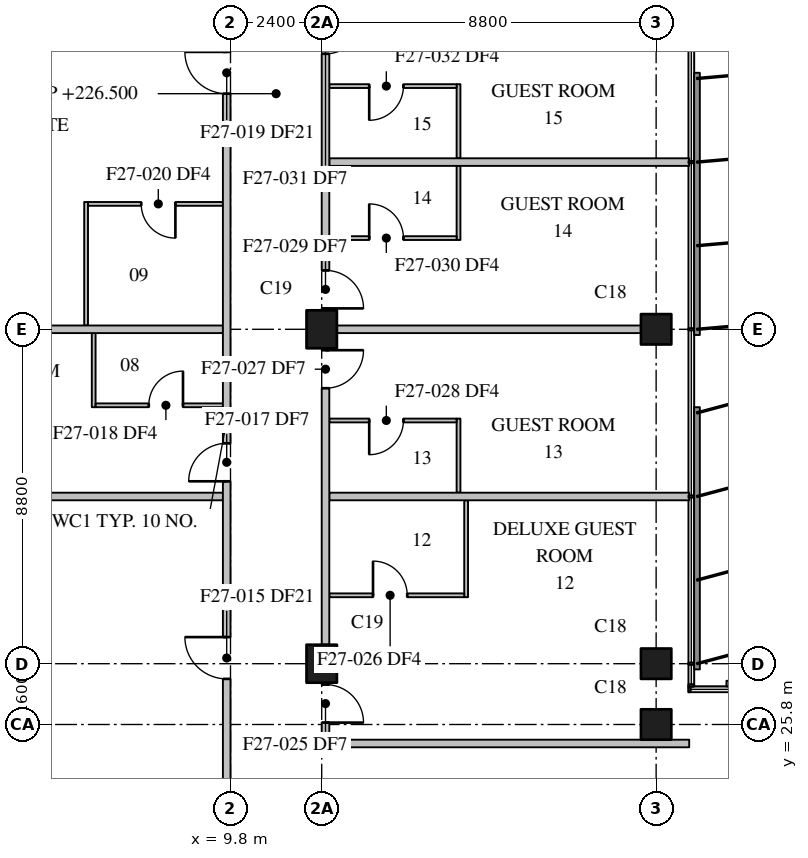
"""IFC4 building model, lengths in metres.
Left out: names, types, materials, properties, quantities, classifications, styles, units other than length and angle.
Written with IfcOpenShell. Run it as: python <this file> out.ifc"""

import sys

from ifc_helpers import new_model, si_unit, direction, frame, frame_2d, origin, origin_2d, place, context, subcontext, project, spatial, rectangle, extrude, element, fill, save


model = new_model("IFC4")
c1 = context("Model", 3, precision=1e-05, world=origin(), true_north=direction((0.0, 1.0)))
c2 = subcontext(c1, "Body", "Model", "MODEL_VIEW")
j1 = project(units=[si_unit("LENGTHUNIT", "METRE"), si_unit("PLANEANGLEUNIT", "RADIAN")], contexts=[c1])
p1 = place(None, origin())
s1 = spatial("IfcSite", under=j1, at=p1, CompositionType="ELEMENT")
p2 = place(p1, origin())
s2 = spatial("IfcBuilding", under=s1, at=p2, CompositionType="ELEMENT")
p3 = place(p2, frame((0.0, 0.0, 226.5)))
s3 = spatial("IfcBuildingStorey", under=s2, at=p3, CompositionType="ELEMENT", Elevation=226.5)
for number, where, z_axis, x_axis in (
    (1, (12.2, 27.4, 0.0), (0.0, 0.0, 1.0), (0.0, 1.0, 0.0)),
    (2, (12.2, 36.2, 0.0), (0.0, 0.0, 1.0), (0.0, 1.0, 0.0)),
):
    element("IfcColumn", number, at=place(p3, frame(where, z_axis=z_axis, x_axis=x_axis)), inside=s3, PredefinedType="COLUMN", context=c2, shape_type="SweptSolid", body=[
        extrude(rectangle(XDim=1.0, YDim=0.8, at=origin_2d()), origin(), (0.0, 0.0, 1.0), 3.7),
    ])
for number, where, z_axis, x_axis in (
    (3, (21.0, 25.8, 0.0), (0.0, 0.0, 1.0), (1.0, 0.0, 0.0)),
    (4, (21.0, 27.4, 0.0), (0.0, 0.0, 1.0), (1.0, 0.0, 0.0)),
    (5, (21.0, 36.2, 0.0), (0.0, 0.0, 1.0), (1.0, 0.0, 0.0)),
):
    element("IfcColumn", number, at=place(p3, frame(where, z_axis=z_axis, x_axis=x_axis)), inside=s3, PredefinedType="COLUMN", context=c2, shape_type="SweptSolid", body=[
        extrude(rectangle(XDim=0.8, YDim=0.8, at=origin_2d()), origin(), (0.0, 0.0, 1.0), 3.7),
    ])
p4 = place(p3, frame((9.7, 9.8, 0.0), z_axis=(0.0, 0.0, 1.0), x_axis=(0.0, 1.0, 0.0)))
e6 = element("IfcWall", 6, at=p4, inside=s3, PredefinedType="PARTITIONING", context=c2, shape_type="SweptSolid", body=[
    extrude(rectangle(XDim=48.0, YDim=0.2, at=frame_2d((24.0, 0.0))), origin(), (0.0, 0.0, 1.0), 3.4),
])
p5 = place(p4, frame((2.55, 0.0, 0.0)))
e7 = element("IfcOpeningElement", 7, at=p5, cuts=e6, PredefinedType="OPENING", context=c2, shape_type="SweptSolid", body=[
    extrude(rectangle(XDim=1.1, YDim=2.1, at=frame_2d((0.55, 1.05))), frame((0.0, 0.11, 0.0), z_axis=(0.0, -1.0, 0.0), x_axis=(1.0, 0.0, 0.0)), (0.0, 0.0, 1.0), 0.22),
])
p6 = place(p4, frame((4.8, 0.0, 0.0)))
e8 = element("IfcOpeningElement", 8, at=p6, cuts=e6, PredefinedType="OPENING", context=c2, shape_type="SweptSolid", body=[
    extrude(rectangle(XDim=1.0, YDim=2.1, at=frame_2d((0.5, 1.05))), frame((0.0, 0.11, 0.0), z_axis=(0.0, -1.0, 0.0), x_axis=(1.0, 0.0, 0.0)), (0.0, 0.0, 1.0), 0.22),
])
p7 = place(p4, frame((17.2, 0.0, 0.0)))
e9 = element("IfcOpeningElement", 9, at=p7, cuts=e6, PredefinedType="OPENING", context=c2, shape_type="SweptSolid", body=[
    extrude(rectangle(XDim=1.1, YDim=2.1, at=frame_2d((0.55, 1.05))), frame((0.0, 0.11, 0.0), z_axis=(0.0, -1.0, 0.0), x_axis=(1.0, 0.0, 0.0)), (0.0, 0.0, 1.0), 0.22),
])
p8 = place(p4, frame((22.4, 0.0, 0.0)))
e10 = element("IfcOpeningElement", 10, at=p8, cuts=e6, PredefinedType="OPENING", context=c2, shape_type="SweptSolid", body=[
    extrude(rectangle(XDim=1.0, YDim=2.1, at=frame_2d((0.5, 1.05))), frame((0.0, 0.11, 0.0), z_axis=(0.0, -1.0, 0.0), x_axis=(1.0, 0.0, 0.0)), (0.0, 0.0, 1.0), 0.22),
])
p9 = place(p4, frame((32.6, 0.0, 0.0)))
e11 = element("IfcOpeningElement", 11, at=p9, cuts=e6, PredefinedType="OPENING", context=c2, shape_type="SweptSolid", body=[
    extrude(rectangle(XDim=1.1, YDim=2.1, at=frame_2d((0.55, 1.05))), frame((0.0, 0.11, 0.0), z_axis=(0.0, -1.0, 0.0), x_axis=(1.0, 0.0, 0.0)), (0.0, 0.0, 1.0), 0.22),
])
p10 = place(p4, frame((35.6, 0.0, 0.0)))
e12 = element("IfcOpeningElement", 12, at=p10, cuts=e6, PredefinedType="OPENING", context=c2, shape_type="SweptSolid", body=[
    extrude(rectangle(XDim=1.0, YDim=2.1, at=frame_2d((0.5, 1.05))), frame((0.0, 0.11, 0.0), z_axis=(0.0, -1.0, 0.0), x_axis=(1.0, 0.0, 0.0)), (0.0, 0.0, 1.0), 0.22),
])
p11 = place(p4, frame((45.6, 0.0, 0.0)))
e13 = element("IfcOpeningElement", 13, at=p11, cuts=e6, PredefinedType="OPENING", context=c2, shape_type="SweptSolid", body=[
    extrude(rectangle(XDim=1.1, YDim=2.1, at=frame_2d((0.55, 1.05))), frame((0.0, 0.11, 0.0), z_axis=(0.0, -1.0, 0.0), x_axis=(1.0, 0.0, 0.0)), (0.0, 0.0, 1.0), 0.22),
])
p12 = place(p3, frame((0.31, 31.8, 0.0), z_axis=(0.0, 0.0, 1.0), x_axis=(1.0, 0.0, 0.0)))
e14 = element("IfcWall", 14, at=p12, inside=s3, PredefinedType="PARTITIONING", context=c2, shape_type="SweptSolid", body=[
    extrude(rectangle(XDim=9.29, YDim=0.2, at=frame_2d((4.645, 0.0))), origin(), (0.0, 0.0, 1.0), 3.4),
])
p13 = place(p3, frame((12.4, 31.8, 0.0), z_axis=(0.0, 0.0, 1.0), x_axis=(1.0, 0.0, 0.0)))
e15 = element("IfcWall", 15, at=p13, inside=s3, PredefinedType="PARTITIONING", context=c2, shape_type="SweptSolid", body=[
    extrude(rectangle(XDim=9.47, YDim=0.2, at=frame_2d((4.735, 0.0))), origin(), (0.0, 0.0, 1.0), 3.4),
])
p14 = place(p3, frame((1.4, 36.2, 0.0), z_axis=(0.0, 0.0, 1.0), x_axis=(1.0, 0.0, 0.0)))
e16 = element("IfcWall", 16, at=p14, inside=s3, PredefinedType="PARTITIONING", context=c2, shape_type="SweptSolid", body=[
    extrude(rectangle(XDim=8.2, YDim=0.2, at=frame_2d((4.1, 0.0))), origin(), (0.0, 0.0, 1.0), 3.4),
])
p15 = place(p3, frame((12.6, 36.2, 0.0), z_axis=(0.0, 0.0, 1.0), x_axis=(1.0, 0.0, 0.0)))
e17 = element("IfcWall", 17, at=p15, inside=s3, PredefinedType="PARTITIONING", context=c2, shape_type="SweptSolid", body=[
    extrude(rectangle(XDim=8.0, YDim=0.2, at=frame_2d((4.0, 0.0))), origin(), (0.0, 0.0, 1.0), 3.4),
])
p16 = place(p3, frame((12.3, 26.9, 0.0), z_axis=(0.0, 0.0, 1.0), x_axis=(0.0, -1.0, 0.0)))
e18 = element("IfcWall", 18, at=p16, inside=s3, PredefinedType="PARTITIONING", context=c2, shape_type="SweptSolid", body=[
    extrude(rectangle(XDim=1.7, YDim=0.2, at=frame_2d((0.85, 0.0))), origin(), (0.0, 0.0, 1.0), 3.4),
])
p17 = place(p16, frame((0.05, 0.0, 0.0)))
e19 = element("IfcOpeningElement", 19, at=p17, cuts=e18, PredefinedType="OPENING", context=c2, shape_type="SweptSolid", body=[
    extrude(rectangle(XDim=1.0, YDim=2.1, at=frame_2d((0.5, 1.05))), frame((0.0, 0.11, 0.0), z_axis=(0.0, -1.0, 0.0), x_axis=(1.0, 0.0, 0.0)), (0.0, 0.0, 1.0), 0.22),
])
p18 = place(p3, frame((12.3, 35.7, 0.0), z_axis=(0.0, 0.0, 1.0), x_axis=(0.0, -1.0, 0.0)))
e20 = element("IfcWall", 20, at=p18, inside=s3, PredefinedType="PARTITIONING", context=c2, shape_type="SweptSolid", body=[
    extrude(rectangle(XDim=7.8, YDim=0.2, at=frame_2d((3.9, 0.0))), origin(), (0.0, 0.0, 1.0), 3.4),
])
p19 = place(p18, frame((0.05, 0.0, 0.0)))
e21 = element("IfcOpeningElement", 21, at=p19, cuts=e20, PredefinedType="OPENING", context=c2, shape_type="SweptSolid", body=[
    extrude(rectangle(XDim=1.0, YDim=2.1, at=frame_2d((0.5, 1.05))), frame((0.0, 0.11, 0.0), z_axis=(0.0, -1.0, 0.0), x_axis=(1.0, 0.0, 0.0)), (0.0, 0.0, 1.0), 0.22),
])
p20 = place(p3, frame((12.3, 44.5, 0.0), z_axis=(0.0, 0.0, 1.0), x_axis=(0.0, -1.0, 0.0)))
e22 = element("IfcWall", 22, at=p20, inside=s3, PredefinedType="PARTITIONING", context=c2, shape_type="SweptSolid", body=[
    extrude(rectangle(XDim=7.8, YDim=0.2, at=frame_2d((3.9, 0.0))), origin(), (0.0, 0.0, 1.0), 3.4),
])
p21 = place(p20, frame((6.75, 0.0, 0.0)))
e23 = element("IfcOpeningElement", 23, at=p21, cuts=e22, PredefinedType="OPENING", context=c2, shape_type="SweptSolid", body=[
    extrude(rectangle(XDim=1.0, YDim=2.1, at=frame_2d((0.5, 1.05))), frame((0.0, 0.11, 0.0), z_axis=(0.0, -1.0, 0.0), x_axis=(1.0, 0.0, 0.0)), (0.0, 0.0, 1.0), 0.22),
])
p22 = place(p20, frame((0.05, 0.0, 0.0)))
e24 = element("IfcOpeningElement", 24, at=p22, cuts=e22, PredefinedType="OPENING", context=c2, shape_type="SweptSolid", body=[
    extrude(rectangle(XDim=1.0, YDim=2.1, at=frame_2d((0.5, 1.05))), frame((0.0, 0.11, 0.0), z_axis=(0.0, -1.0, 0.0), x_axis=(1.0, 0.0, 0.0)), (0.0, 0.0, 1.0), 0.22),
])
for number, where, z_axis, x_axis in (
    (25, (12.4, 25.3, 0.0), (0.0, 0.0, 1.0), (1.0, 0.0, 0.0)),
    (26, (12.4, 40.6, 0.0), (0.0, 0.0, 1.0), (1.0, 0.0, 0.0)),
):
    element("IfcWall", number, at=place(p3, frame(where, z_axis=z_axis, x_axis=x_axis)), inside=s3, PredefinedType="PARTITIONING", context=c2, shape_type="SweptSolid", body=[
        extrude(rectangle(XDim=9.47, YDim=0.2, at=frame_2d((4.735, 0.0))), origin(), (0.0, 0.0, 1.0), 3.4),
    ])
p23 = place(p3, frame((6.2, 34.15, 0.0), z_axis=(0.0, 0.0, 1.0), x_axis=(0.0, 1.0, 0.0)))
e27 = element("IfcWall", 27, at=p23, inside=s3, PredefinedType="PARTITIONING", context=c2, shape_type="SweptSolid", body=[
    extrude(rectangle(XDim=1.95, YDim=0.1, at=frame_2d((0.975, 0.0))), origin(), (0.0, 0.0, 1.0), 3.4),
])
p24 = place(p3, frame((6.0, 36.3, 0.0), z_axis=(0.0, 0.0, 1.0), x_axis=(0.0, 1.0, 0.0)))
e28 = element("IfcWall", 28, at=p24, inside=s3, PredefinedType="PARTITIONING", context=c2, shape_type="SweptSolid", body=[
    extrude(rectangle(XDim=3.25, YDim=0.1, at=frame_2d((1.625, 0.0))), origin(), (0.0, 0.0, 1.0), 3.4),
])
p25 = place(p3, frame((6.25, 34.2, 0.0), z_axis=(0.0, 0.0, 1.0), x_axis=(1.0, 0.0, 0.0)))
e29 = element("IfcWall", 29, at=p25, inside=s3, PredefinedType="PARTITIONING", context=c2, shape_type="SweptSolid", body=[
    extrude(rectangle(XDim=3.35, YDim=0.1, at=frame_2d((1.675, 0.0))), origin(), (0.0, 0.0, 1.0), 3.4),
])
p26 = place(p25, frame((1.4, 0.0, 0.0)))
e30 = element("IfcOpeningElement", 30, at=p26, cuts=e29, PredefinedType="OPENING", context=c2, shape_type="SweptSolid", body=[
    extrude(rectangle(XDim=0.9, YDim=2.1, at=frame_2d((0.45, 1.05))), frame((0.0, 0.06, 0.0), z_axis=(0.0, -1.0, 0.0), x_axis=(1.0, 0.0, 0.0)), (0.0, 0.0, 1.0), 0.12),
])
p27 = place(p3, frame((9.6, 39.5, 0.0), z_axis=(0.0, 0.0, 1.0), x_axis=(-1.0, 0.0, 0.0)))
e31 = element("IfcWall", 31, at=p27, inside=s3, PredefinedType="PARTITIONING", context=c2, shape_type="SweptSolid", body=[
    extrude(rectangle(XDim=3.55, YDim=0.1, at=frame_2d((1.775, 0.0))), origin(), (0.0, 0.0, 1.0), 3.4),
])
p28 = place(p27, frame((1.25, 0.0, 0.0)))
e32 = element("IfcOpeningElement", 32, at=p28, cuts=e31, PredefinedType="OPENING", context=c2, shape_type="SweptSolid", body=[
    extrude(rectangle(XDim=0.9, YDim=2.1, at=frame_2d((0.45, 1.05))), frame((0.0, 0.06, 0.0), z_axis=(0.0, -1.0, 0.0), x_axis=(1.0, 0.0, 0.0)), (0.0, 0.0, 1.0), 0.12),
])
p29 = place(p3, frame((16.0, 29.15, 0.0), z_axis=(0.0, 0.0, 1.0), x_axis=(0.0, 1.0, 0.0)))
e33 = element("IfcWall", 33, at=p29, inside=s3, PredefinedType="PARTITIONING", context=c2, shape_type="SweptSolid", body=[
    extrude(rectangle(XDim=2.55, YDim=0.1, at=frame_2d((1.275, 0.0))), origin(), (0.0, 0.0, 1.0), 3.4),
])
p30 = place(p3, frame((12.4, 29.2, 0.0), z_axis=(0.0, 0.0, 1.0), x_axis=(1.0, 0.0, 0.0)))
e34 = element("IfcWall", 34, at=p30, inside=s3, PredefinedType="PARTITIONING", context=c2, shape_type="SweptSolid", body=[
    extrude(rectangle(XDim=3.55, YDim=0.1, at=frame_2d((1.775, 0.0))), origin(), (0.0, 0.0, 1.0), 3.4),
])
p31 = place(p30, frame((1.15, 0.0, 0.0)))
e35 = element("IfcOpeningElement", 35, at=p31, cuts=e34, PredefinedType="OPENING", context=c2, shape_type="SweptSolid", body=[
    extrude(rectangle(XDim=0.9, YDim=2.1, at=frame_2d((0.45, 1.05))), frame((0.0, 0.06, 0.0), z_axis=(0.0, -1.0, 0.0), x_axis=(1.0, 0.0, 0.0)), (0.0, 0.0, 1.0), 0.12),
])
p32 = place(p3, frame((15.8, 31.9, 0.0), z_axis=(0.0, 0.0, 1.0), x_axis=(0.0, 1.0, 0.0)))
e36 = element("IfcWall", 36, at=p32, inside=s3, PredefinedType="PARTITIONING", context=c2, shape_type="SweptSolid", body=[
    extrude(rectangle(XDim=1.95, YDim=0.1, at=frame_2d((0.975, 0.0))), origin(), (0.0, 0.0, 1.0), 3.4),
])
for number, where, z_axis, x_axis in (
    (37, (15.8, 38.55, 0.0), (0.0, 0.0, 1.0), (0.0, 1.0, 0.0)),
    (38, (15.8, 40.7, 0.0), (0.0, 0.0, 1.0), (0.0, 1.0, 0.0)),
):
    element("IfcWall", number, at=place(p3, frame(where, z_axis=z_axis, x_axis=x_axis)), inside=s3, PredefinedType="PARTITIONING", context=c2, shape_type="SweptSolid", body=[
        extrude(rectangle(XDim=1.95, YDim=0.1, at=frame_2d((0.975, 0.0))), origin(), (0.0, 0.0, 1.0), 3.4),
    ])
p33 = place(p3, frame((15.75, 33.8, 0.0), z_axis=(0.0, 0.0, 1.0), x_axis=(-1.0, 0.0, 0.0)))
e39 = element("IfcWall", 39, at=p33, inside=s3, PredefinedType="PARTITIONING", context=c2, shape_type="SweptSolid", body=[
    extrude(rectangle(XDim=3.35, YDim=0.1, at=frame_2d((1.675, 0.0))), origin(), (0.0, 0.0, 1.0), 3.4),
])
p34 = place(p33, frame((1.4, 0.0, 0.0)))
e40 = element("IfcOpeningElement", 40, at=p34, cuts=e39, PredefinedType="OPENING", context=c2, shape_type="SweptSolid", body=[
    extrude(rectangle(XDim=0.9, YDim=2.1, at=frame_2d((0.45, 1.05))), frame((0.0, 0.06, 0.0), z_axis=(0.0, -1.0, 0.0), x_axis=(1.0, 0.0, 0.0)), (0.0, 0.0, 1.0), 0.12),
])
p35 = place(p3, frame((12.4, 38.6, 0.0), z_axis=(0.0, 0.0, 1.0), x_axis=(1.0, 0.0, 0.0)))
e41 = element("IfcWall", 41, at=p35, inside=s3, PredefinedType="PARTITIONING", context=c2, shape_type="SweptSolid", body=[
    extrude(rectangle(XDim=3.35, YDim=0.1, at=frame_2d((1.675, 0.0))), origin(), (0.0, 0.0, 1.0), 3.4),
])
p36 = place(p35, frame((1.05, 0.0, 0.0)))
e42 = element("IfcOpeningElement", 42, at=p36, cuts=e41, PredefinedType="OPENING", context=c2, shape_type="SweptSolid", body=[
    extrude(rectangle(XDim=0.9, YDim=2.1, at=frame_2d((0.45, 1.05))), frame((0.0, 0.06, 0.0), z_axis=(0.0, -1.0, 0.0), x_axis=(1.0, 0.0, 0.0)), (0.0, 0.0, 1.0), 0.12),
])
p37 = place(p3, frame((15.75, 42.6, 0.0), z_axis=(0.0, 0.0, 1.0), x_axis=(-1.0, 0.0, 0.0)))
e43 = element("IfcWall", 43, at=p37, inside=s3, PredefinedType="PARTITIONING", context=c2, shape_type="SweptSolid", body=[
    extrude(rectangle(XDim=3.35, YDim=0.1, at=frame_2d((1.675, 0.0))), origin(), (0.0, 0.0, 1.0), 3.4),
])
p38 = place(p37, frame((1.4, 0.0, 0.0)))
e44 = element("IfcOpeningElement", 44, at=p38, cuts=e43, PredefinedType="OPENING", context=c2, shape_type="SweptSolid", body=[
    extrude(rectangle(XDim=0.9, YDim=2.1, at=frame_2d((0.45, 1.05))), frame((0.0, 0.06, 0.0), z_axis=(0.0, -1.0, 0.0), x_axis=(1.0, 0.0, 0.0)), (0.0, 0.0, 1.0), 0.12),
])
p39 = place(p7, origin())
e45 = element("IfcDoor", 45, at=p39, inside=s3, OperationType="SINGLE_SWING_RIGHT", PredefinedType="DOOR", context=c2, shape_type="SweptSolid", body=[
    extrude(rectangle(XDim=1.1, YDim=2.1, at=frame_2d((0.55, 1.05))), frame((0.0, 0.025, 0.0), z_axis=(0.0, -1.0, 0.0), x_axis=(1.0, 0.0, 0.0)), (0.0, 0.0, 1.0), 0.05),
])
fill(e9, e45)
p40 = place(p8, origin())
e46 = element("IfcDoor", 46, at=p40, inside=s3, OperationType="SINGLE_SWING_LEFT", PredefinedType="DOOR", context=c2, shape_type="SweptSolid", body=[
    extrude(rectangle(XDim=1.0, YDim=2.1, at=frame_2d((0.5, 1.05))), frame((0.0, 0.025, 0.0), z_axis=(0.0, -1.0, 0.0), x_axis=(1.0, 0.0, 0.0)), (0.0, 0.0, 1.0), 0.05),
])
fill(e10, e46)
p41 = place(p26, origin())
e47 = element("IfcDoor", 47, at=p41, inside=s3, OperationType="SINGLE_SWING_RIGHT", PredefinedType="DOOR", context=c2, shape_type="SweptSolid", body=[
    extrude(rectangle(XDim=0.9, YDim=2.1, at=frame_2d((0.45, 1.05))), frame((0.0, 0.025, 0.0), z_axis=(0.0, -1.0, 0.0), x_axis=(1.0, 0.0, 0.0)), (0.0, 0.0, 1.0), 0.05),
])
fill(e30, e47)
p42 = place(p9, origin())
e48 = element("IfcDoor", 48, at=p42, inside=s3, OperationType="SINGLE_SWING_RIGHT", PredefinedType="DOOR", context=c2, shape_type="SweptSolid", body=[
    extrude(rectangle(XDim=1.1, YDim=2.1, at=frame_2d((0.55, 1.05))), frame((0.0, 0.025, 0.0), z_axis=(0.0, -1.0, 0.0), x_axis=(1.0, 0.0, 0.0)), (0.0, 0.0, 1.0), 0.05),
])
fill(e11, e48)
p43 = place(p28, origin())
e49 = element("IfcDoor", 49, at=p43, inside=s3, OperationType="SINGLE_SWING_LEFT", PredefinedType="DOOR", context=c2, shape_type="SweptSolid", body=[
    extrude(rectangle(XDim=0.9, YDim=2.1, at=frame_2d((0.45, 1.05))), frame((0.0, 0.025, 0.0), z_axis=(0.0, -1.0, 0.0), x_axis=(1.0, 0.0, 0.0)), (0.0, 0.0, 1.0), 0.05),
])
fill(e32, e49)
p44 = place(p17, origin())
e50 = element("IfcDoor", 50, at=p44, inside=s3, OperationType="SINGLE_SWING_RIGHT", PredefinedType="DOOR", context=c2, shape_type="SweptSolid", body=[
    extrude(rectangle(XDim=1.0, YDim=2.1, at=frame_2d((0.5, 1.05))), frame((0.0, 0.025, 0.0), z_axis=(0.0, -1.0, 0.0), x_axis=(1.0, 0.0, 0.0)), (0.0, 0.0, 1.0), 0.05),
])
fill(e19, e50)
p45 = place(p31, origin())
e51 = element("IfcDoor", 51, at=p45, inside=s3, OperationType="SINGLE_SWING_LEFT", PredefinedType="DOOR", context=c2, shape_type="SweptSolid", body=[
    extrude(rectangle(XDim=0.9, YDim=2.1, at=frame_2d((0.45, 1.05))), frame((0.0, 0.025, 0.0), z_axis=(0.0, -1.0, 0.0), x_axis=(1.0, 0.0, 0.0)), (0.0, 0.0, 1.0), 0.05),
])
fill(e35, e51)
p46 = place(p19, origin())
e52 = element("IfcDoor", 52, at=p46, inside=s3, OperationType="SINGLE_SWING_LEFT", PredefinedType="DOOR", context=c2, shape_type="SweptSolid", body=[
    extrude(rectangle(XDim=1.0, YDim=2.1, at=frame_2d((0.5, 1.05))), frame((0.0, 0.025, 0.0), z_axis=(0.0, -1.0, 0.0), x_axis=(1.0, 0.0, 0.0)), (0.0, 0.0, 1.0), 0.05),
])
fill(e21, e52)
p47 = place(p34, origin())
e53 = element("IfcDoor", 53, at=p47, inside=s3, OperationType="SINGLE_SWING_RIGHT", PredefinedType="DOOR", context=c2, shape_type="SweptSolid", body=[
    extrude(rectangle(XDim=0.9, YDim=2.1, at=frame_2d((0.45, 1.05))), frame((0.0, 0.025, 0.0), z_axis=(0.0, -1.0, 0.0), x_axis=(1.0, 0.0, 0.0)), (0.0, 0.0, 1.0), 0.05),
])
fill(e40, e53)
p48 = place(p21, origin())
e54 = element("IfcDoor", 54, at=p48, inside=s3, OperationType="SINGLE_SWING_RIGHT", PredefinedType="DOOR", context=c2, shape_type="SweptSolid", body=[
    extrude(rectangle(XDim=1.0, YDim=2.1, at=frame_2d((0.5, 1.05))), frame((0.0, 0.025, 0.0), z_axis=(0.0, -1.0, 0.0), x_axis=(1.0, 0.0, 0.0)), (0.0, 0.0, 1.0), 0.05),
])
fill(e23, e54)
p49 = place(p36, origin())
e55 = element("IfcDoor", 55, at=p49, inside=s3, OperationType="SINGLE_SWING_LEFT", PredefinedType="DOOR", context=c2, shape_type="SweptSolid", body=[
    extrude(rectangle(XDim=0.9, YDim=2.1, at=frame_2d((0.45, 1.05))), frame((0.0, 0.025, 0.0), z_axis=(0.0, -1.0, 0.0), x_axis=(1.0, 0.0, 0.0)), (0.0, 0.0, 1.0), 0.05),
])
fill(e42, e55)
p50 = place(p22, origin())
e56 = element("IfcDoor", 56, at=p50, inside=s3, OperationType="SINGLE_SWING_LEFT", PredefinedType="DOOR", context=c2, shape_type="SweptSolid", body=[
    extrude(rectangle(XDim=1.0, YDim=2.1, at=frame_2d((0.5, 1.05))), frame((0.0, 0.025, 0.0), z_axis=(0.0, -1.0, 0.0), x_axis=(1.0, 0.0, 0.0)), (0.0, 0.0, 1.0), 0.05),
])
fill(e24, e56)
p51 = place(p38, origin())
e57 = element("IfcDoor", 57, at=p51, inside=s3, OperationType="SINGLE_SWING_RIGHT", PredefinedType="DOOR", context=c2, shape_type="SweptSolid", body=[
    extrude(rectangle(XDim=0.9, YDim=2.1, at=frame_2d((0.45, 1.05))), frame((0.0, 0.025, 0.0), z_axis=(0.0, -1.0, 0.0), x_axis=(1.0, 0.0, 0.0)), (0.0, 0.0, 1.0), 0.05),
])
fill(e44, e57)
save(model, sys.argv[1])
